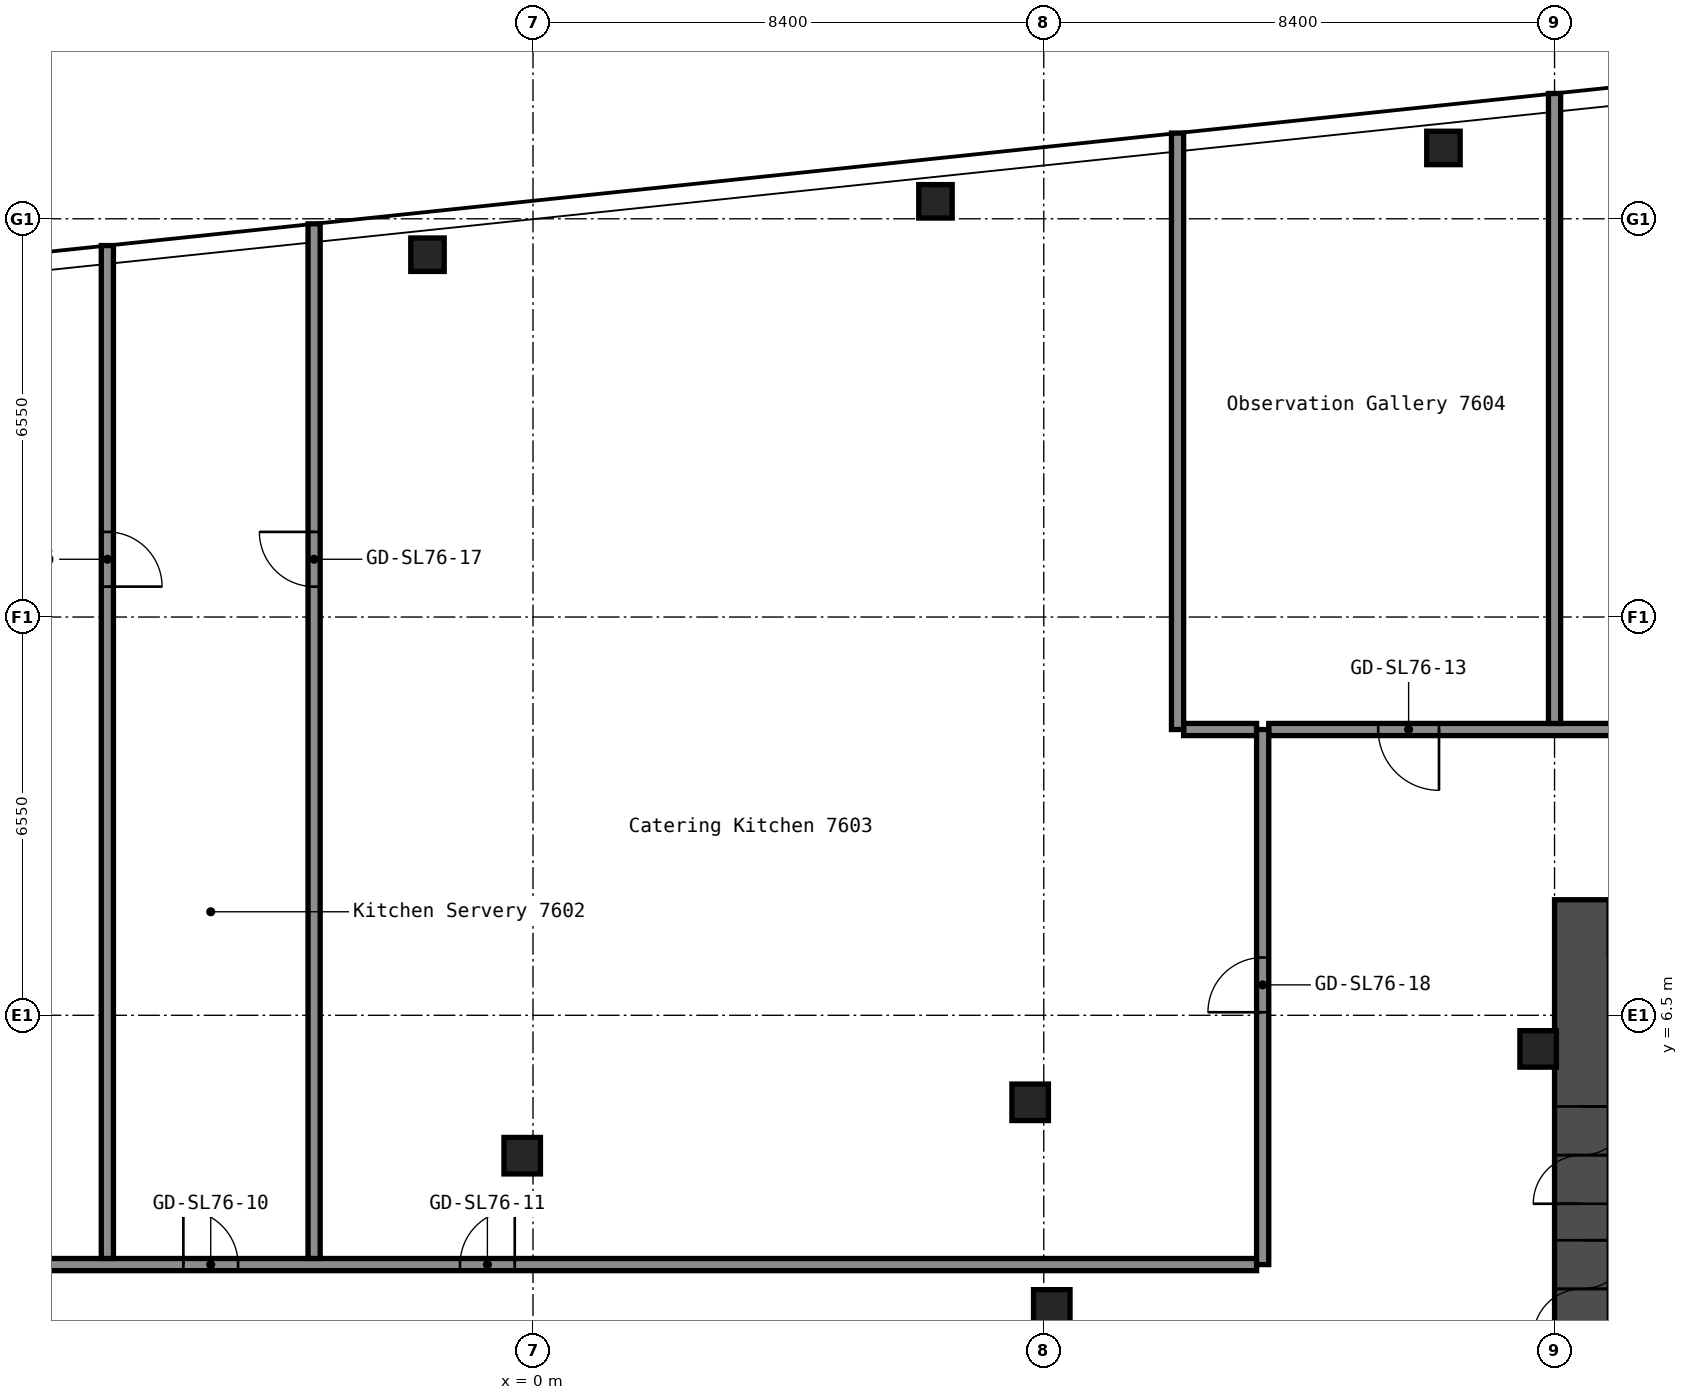
"""IFC4 building model, lengths in metres.
Left out: names, types, materials, properties, quantities, classifications, styles, units other than length and angle.
Written with IfcOpenShell. Run it as: python <this file> out.ifc"""

import sys

from ifc_helpers import new_model, si_unit, direction, frame, frame_2d, origin, origin_2d, place, context, subcontext, project, spatial, rectangle, hollow_rectangle, extrude, element, fill, save


model = new_model("IFC4")
c1 = context("Model", 3, precision=1e-05, world=origin(), true_north=direction((0.0, 1.0)))
c2 = subcontext(c1, "Body", "Model", "MODEL_VIEW")
j1 = project(units=[si_unit("LENGTHUNIT", "METRE"), si_unit("PLANEANGLEUNIT", "RADIAN")], contexts=[c1])
p1 = place(None, origin())
s1 = spatial("IfcSite", under=j1, at=p1, CompositionType="ELEMENT")
p2 = place(p1, origin())
s2 = spatial("IfcBuilding", under=s1, at=p2, CompositionType="ELEMENT")
p3 = place(p2, frame((0.0, 0.0, 270.6)))
s3 = spatial("IfcBuildingStorey", under=s2, at=p3, CompositionType="ELEMENT", Elevation=270.6)
p4 = place(p3, frame((-0.178, 4.191, 0.0), z_axis=(0.0, 0.0, 1.0), x_axis=(1.0, 0.0, 0.0)))
e1 = element("IfcColumn", 1, at=p4, inside=s3, PredefinedType="COLUMN", context=c2, shape_type="SweptSolid", body=[
    extrude(hollow_rectangle(XDim=0.6, YDim=0.6, WallThickness=0.025, InnerFilletRadius=0.038, OuterFilletRadius=0.062, at=origin_2d()), origin(), (0.0, 0.0, 1.0), 5.55),
])
p5 = place(p3, frame((-1.735, 19.009, 0.0), z_axis=(0.0, 0.0, 1.0), x_axis=(1.0, 0.0, 0.0)))
e2 = element("IfcColumn", 2, at=p5, inside=s3, PredefinedType="COLUMN", context=c2, shape_type="SweptSolid", body=[
    extrude(hollow_rectangle(XDim=0.55, YDim=0.55, WallThickness=0.022, InnerFilletRadius=0.033, OuterFilletRadius=0.055, at=origin_2d()), origin(), (0.0, 0.0, 1.0), 5.55),
])
for number, where, z_axis, x_axis in (
    (3, (8.532, 1.688, 0.0), (0.0, 0.0, 1.0), (1.0, 0.0, 0.0)),
    (4, (8.176, 5.069, 0.0), (0.0, 0.0, 1.0), (1.0, 0.0, 0.0)),
):
    element("IfcColumn", number, at=place(p3, frame(where, z_axis=z_axis, x_axis=x_axis)), inside=s3, PredefinedType="COLUMN", context=c2, shape_type="SweptSolid", body=[
        extrude(hollow_rectangle(XDim=0.6, YDim=0.6, WallThickness=0.025, InnerFilletRadius=0.038, OuterFilletRadius=0.062, at=origin_2d()), origin(), (0.0, 0.0, 1.0), 5.55),
    ])
p6 = place(p3, frame((6.619, 19.887, 0.0), z_axis=(0.0, 0.0, 1.0), x_axis=(1.0, 0.0, 0.0)))
e5 = element("IfcColumn", 5, at=p6, inside=s3, PredefinedType="COLUMN", context=c2, shape_type="SweptSolid", body=[
    extrude(hollow_rectangle(XDim=0.55, YDim=0.55, WallThickness=0.022, InnerFilletRadius=0.033, OuterFilletRadius=0.055, at=origin_2d()), origin(), (0.0, 0.0, 1.0), 5.55),
])
p7 = place(p3, frame((16.53, 5.947, 0.0), z_axis=(0.0, 0.0, 1.0), x_axis=(1.0, 0.0, 0.0)))
e6 = element("IfcColumn", 6, at=p7, inside=s3, PredefinedType="COLUMN", context=c2, shape_type="SweptSolid", body=[
    extrude(hollow_rectangle(XDim=0.6, YDim=0.6, WallThickness=0.025, InnerFilletRadius=0.038, OuterFilletRadius=0.062, at=origin_2d()), origin(), (0.0, 0.0, 1.0), 5.55),
])
p8 = place(p3, frame((14.973, 20.765, 0.0), z_axis=(0.0, 0.0, 1.0), x_axis=(1.0, 0.0, 0.0)))
e7 = element("IfcColumn", 7, at=p8, inside=s3, PredefinedType="COLUMN", context=c2, shape_type="SweptSolid", body=[
    extrude(hollow_rectangle(XDim=0.55, YDim=0.55, WallThickness=0.022, InnerFilletRadius=0.033, OuterFilletRadius=0.055, at=origin_2d()), origin(), (0.0, 0.0, 1.0), 5.55),
])
p9 = place(p3, frame((17.25, -8.4, 0.0), z_axis=(0.0, 0.0, 1.0), x_axis=(0.0, 1.0, 0.0)))
e8 = element("IfcWall", 8, at=p9, inside=s3, PredefinedType="SHEAR", context=c2, shape_type="SweptSolid", body=[
    extrude(rectangle(XDim=16.8, YDim=0.9, at=frame_2d((8.4, 0.0))), origin(), (0.0, 0.0, 1.0), 5.55),
])
p10 = place(p9, frame((3.4, 0.0, 0.0)))
e9 = element("IfcOpeningElement", 9, at=p10, cuts=e8, PredefinedType="OPENING", context=c2, shape_type="SweptSolid", body=[
    extrude(rectangle(XDim=1.6, YDim=2.1, at=frame_2d((0.8, 1.05))), frame((0.0, 0.46, 0.0), z_axis=(0.0, -1.0, 0.0), x_axis=(1.0, 0.0, 0.0)), (0.0, 0.0, 1.0), 0.92),
])
p11 = place(p9, frame((9.6, 0.0, 0.0)))
e10 = element("IfcOpeningElement", 10, at=p11, cuts=e8, PredefinedType="OPENING", context=c2, shape_type="SweptSolid", body=[
    extrude(rectangle(XDim=1.6, YDim=2.1, at=frame_2d((0.8, 1.05))), frame((0.0, 0.46, 0.0), z_axis=(0.0, -1.0, 0.0), x_axis=(1.0, 0.0, 0.0)), (0.0, 0.0, 1.0), 0.92),
])
p12 = place(p9, frame((11.8, 0.0, 0.0)))
e11 = element("IfcOpeningElement", 11, at=p12, cuts=e8, PredefinedType="OPENING", context=c2, shape_type="SweptSolid", body=[
    extrude(rectangle(XDim=1.6, YDim=2.1, at=frame_2d((0.8, 1.05))), frame((0.0, 0.46, 0.0), z_axis=(0.0, -1.0, 0.0), x_axis=(1.0, 0.0, 0.0)), (0.0, 0.0, 1.0), 0.92),
])
p13 = place(p3, frame((-13.1, 2.4, 0.0), z_axis=(0.0, 0.0, 1.0), x_axis=(1.0, 0.0, 0.0)))
e12 = element("IfcWall", 12, at=p13, inside=s3, PredefinedType="PARTITIONING", context=c2, shape_type="SweptSolid", body=[
    extrude(rectangle(XDim=25.0, YDim=0.2, at=frame_2d((12.5, 0.0))), origin(), (0.0, 0.0, 1.0), 5.55),
])
p14 = place(p13, frame((0.2, 0.0, 0.0)))
e13 = element("IfcOpeningElement", 13, at=p14, cuts=e12, PredefinedType="OPENING", context=c2, shape_type="SweptSolid", body=[
    extrude(rectangle(XDim=1.6, YDim=2.1, at=frame_2d((0.8, 1.05))), frame((0.0, 0.11, 0.0), z_axis=(0.0, -1.0, 0.0), x_axis=(1.0, 0.0, 0.0)), (0.0, 0.0, 1.0), 0.22),
])
p15 = place(p13, frame((7.35, 0.0, 0.0)))
e14 = element("IfcOpeningElement", 14, at=p15, cuts=e12, PredefinedType="OPENING", context=c2, shape_type="SweptSolid", body=[
    extrude(rectangle(XDim=0.9, YDim=2.1, at=frame_2d((0.45, 1.05))), frame((0.0, 0.11, 0.0), z_axis=(0.0, -1.0, 0.0), x_axis=(1.0, 0.0, 0.0)), (0.0, 0.0, 1.0), 0.22),
])
p16 = place(p13, frame((11.9, 0.0, 0.0)))
e15 = element("IfcOpeningElement", 15, at=p16, cuts=e12, PredefinedType="OPENING", context=c2, shape_type="SweptSolid", body=[
    extrude(rectangle(XDim=0.9, YDim=2.1, at=frame_2d((0.45, 1.05))), frame((0.0, 0.11, 0.0), z_axis=(0.0, -1.0, 0.0), x_axis=(1.0, 0.0, 0.0)), (0.0, 0.0, 1.0), 0.22),
])
p17 = place(p3, frame((10.7, 11.2, 0.0), z_axis=(0.0, 0.0, 1.0), x_axis=(1.0, 0.0, 0.0)))
e16 = element("IfcWall", 16, at=p17, inside=s3, PredefinedType="PARTITIONING", context=c2, shape_type="SweptSolid", body=[
    extrude(rectangle(XDim=1.2, YDim=0.2, at=frame_2d((0.6, 0.0))), origin(), (0.0, 0.0, 1.0), 5.55),
])
p18 = place(p3, frame((12.1, 11.2, 0.0), z_axis=(0.0, 0.0, 1.0), x_axis=(1.0, 0.0, 0.0)))
e17 = element("IfcWall", 17, at=p18, inside=s3, PredefinedType="PARTITIONING", context=c2, shape_type="SweptSolid", body=[
    extrude(rectangle(XDim=25.295, YDim=0.2, at=frame_2d((12.648, 0.0))), origin(), (0.0, 0.0, 1.0), 5.55),
])
p19 = place(p18, frame((1.8, 0.0, 0.0)))
e18 = element("IfcOpeningElement", 18, at=p19, cuts=e17, PredefinedType="OPENING", context=c2, shape_type="SweptSolid", body=[
    extrude(rectangle(XDim=1.0, YDim=2.1, at=frame_2d((0.5, 1.05))), frame((0.0, 0.11, 0.0), z_axis=(0.0, -1.0, 0.0), x_axis=(1.0, 0.0, 0.0)), (0.0, 0.0, 1.0), 0.22),
])
p20 = place(p18, frame((9.6, 0.0, 0.0)))
e19 = element("IfcOpeningElement", 19, at=p20, cuts=e17, PredefinedType="OPENING", context=c2, shape_type="SweptSolid", body=[
    extrude(rectangle(XDim=1.6, YDim=2.1, at=frame_2d((0.8, 1.05))), frame((0.0, 0.11, 0.0), z_axis=(0.0, -1.0, 0.0), x_axis=(1.0, 0.0, 0.0)), (0.0, 0.0, 1.0), 0.22),
])
p21 = place(p18, frame((20.8, 0.0, 0.0)))
e20 = element("IfcOpeningElement", 20, at=p21, cuts=e17, PredefinedType="OPENING", context=c2, shape_type="SweptSolid", body=[
    extrude(rectangle(XDim=1.0, YDim=2.1, at=frame_2d((0.5, 1.05))), frame((0.0, 0.11, 0.0), z_axis=(0.0, -1.0, 0.0), x_axis=(1.0, 0.0, 0.0)), (0.0, 0.0, 1.0), 0.22),
])
p22 = place(p3, frame((-7.0, 2.5, 0.0), z_axis=(0.0, 0.0, 1.0), x_axis=(0.0, 1.0, 0.0)))
e21 = element("IfcWall", 21, at=p22, inside=s3, PredefinedType="PARTITIONING", context=c2, shape_type="SweptSolid", body=[
    extrude(rectangle(XDim=16.66, YDim=0.2, at=frame_2d((8.33, 0.0))), origin(), (0.0, 0.0, 1.0), 5.55),
])
p23 = place(p22, frame((11.05, 0.0, 0.0)))
e22 = element("IfcOpeningElement", 22, at=p23, cuts=e21, PredefinedType="OPENING", context=c2, shape_type="SweptSolid", body=[
    extrude(rectangle(XDim=0.9, YDim=2.1, at=frame_2d((0.45, 1.05))), frame((0.0, 0.11, 0.0), z_axis=(0.0, -1.0, 0.0), x_axis=(1.0, 0.0, 0.0)), (0.0, 0.0, 1.0), 0.22),
])
p24 = place(p3, frame((-3.6, 2.5, 0.0), z_axis=(0.0, 0.0, 1.0), x_axis=(0.0, 1.0, 0.0)))
e23 = element("IfcWall", 23, at=p24, inside=s3, PredefinedType="PARTITIONING", context=c2, shape_type="SweptSolid", body=[
    extrude(rectangle(XDim=17.017, YDim=0.2, at=frame_2d((8.508, 0.0))), origin(), (0.0, 0.0, 1.0), 5.55),
])
p25 = place(p24, frame((11.05, 0.0, 0.0)))
e24 = element("IfcOpeningElement", 24, at=p25, cuts=e23, PredefinedType="OPENING", context=c2, shape_type="SweptSolid", body=[
    extrude(rectangle(XDim=0.9, YDim=2.1, at=frame_2d((0.45, 1.05))), frame((0.0, 0.11, 0.0), z_axis=(0.0, -1.0, 0.0), x_axis=(1.0, 0.0, 0.0)), (0.0, 0.0, 1.0), 0.22),
])
p26 = place(p3, frame((10.6, 11.2, 0.0), z_axis=(0.0, 0.0, 1.0), x_axis=(0.0, 1.0, 0.0)))
e25 = element("IfcWall", 25, at=p26, inside=s3, PredefinedType="PARTITIONING", context=c2, shape_type="SweptSolid", body=[
    extrude(rectangle(XDim=9.81, YDim=0.2, at=frame_2d((4.905, 0.0))), origin(), (0.0, 0.0, 1.0), 5.55),
])
p27 = place(p3, frame((12.0, 2.4, 0.0), z_axis=(0.0, 0.0, 1.0), x_axis=(0.0, 1.0, 0.0)))
e26 = element("IfcWall", 26, at=p27, inside=s3, PredefinedType="PARTITIONING", context=c2, shape_type="SweptSolid", body=[
    extrude(rectangle(XDim=8.8, YDim=0.2, at=frame_2d((4.4, 0.0))), origin(), (0.0, 0.0, 1.0), 5.55),
])
p28 = place(p27, frame((4.15, 0.0, 0.0)))
e27 = element("IfcOpeningElement", 27, at=p28, cuts=e26, PredefinedType="OPENING", context=c2, shape_type="SweptSolid", body=[
    extrude(rectangle(XDim=0.9, YDim=2.1, at=frame_2d((0.45, 1.05))), frame((0.0, 0.11, 0.0), z_axis=(0.0, -1.0, 0.0), x_axis=(1.0, 0.0, 0.0)), (0.0, 0.0, 1.0), 0.22),
])
p29 = place(p3, frame((16.8, 11.3, 0.0), z_axis=(0.0, 0.0, 1.0), x_axis=(0.0, 1.0, 0.0)))
e28 = element("IfcWall", 28, at=p29, inside=s3, PredefinedType="PARTITIONING", context=c2, shape_type="SweptSolid", body=[
    extrude(rectangle(XDim=10.361, YDim=0.2, at=frame_2d((5.18, 0.0))), origin(), (0.0, 0.0, 1.0), 5.55),
])
p30 = place(p11, origin())
e29 = element("IfcDoor", 29, at=p30, inside=s3, OperationType="DOUBLE_DOOR_SINGLE_SWING", PredefinedType="DOOR", context=c2, shape_type="SweptSolid", body=[
    extrude(rectangle(XDim=1.6, YDim=2.1, at=frame_2d((0.8, 1.05))), frame((0.0, 0.025, 0.0), z_axis=(0.0, -1.0, 0.0), x_axis=(1.0, 0.0, 0.0)), (0.0, 0.0, 1.0), 0.05),
])
fill(e10, e29)
p31 = place(p12, origin())
e30 = element("IfcDoor", 30, at=p31, inside=s3, OperationType="DOUBLE_DOOR_SINGLE_SWING", PredefinedType="DOOR", context=c2, shape_type="SweptSolid", body=[
    extrude(rectangle(XDim=1.6, YDim=2.1, at=frame_2d((0.8, 1.05))), frame((0.0, 0.025, 0.0), z_axis=(0.0, -1.0, 0.0), x_axis=(1.0, 0.0, 0.0)), (0.0, 0.0, 1.0), 0.05),
])
fill(e11, e30)
p32 = place(p15, origin())
e31 = element("IfcDoor", 31, at=p32, inside=s3, OperationType="SINGLE_SWING_RIGHT", PredefinedType="DOOR", context=c2, shape_type="SweptSolid", body=[
    extrude(rectangle(XDim=0.9, YDim=2.1, at=frame_2d((0.45, 1.05))), frame((0.0, 0.025, 0.0), z_axis=(0.0, -1.0, 0.0), x_axis=(1.0, 0.0, 0.0)), (0.0, 0.0, 1.0), 0.05),
])
fill(e14, e31)
p33 = place(p16, origin())
e32 = element("IfcDoor", 32, at=p33, inside=s3, OperationType="SINGLE_SWING_LEFT", PredefinedType="DOOR", context=c2, shape_type="SweptSolid", body=[
    extrude(rectangle(XDim=0.9, YDim=2.1, at=frame_2d((0.45, 1.05))), frame((0.0, 0.025, 0.0), z_axis=(0.0, -1.0, 0.0), x_axis=(1.0, 0.0, 0.0)), (0.0, 0.0, 1.0), 0.05),
])
fill(e15, e32)
p34 = place(p19, origin())
e33 = element("IfcDoor", 33, at=p34, inside=s3, OperationType="SINGLE_SWING_RIGHT", PredefinedType="DOOR", context=c2, shape_type="SweptSolid", body=[
    extrude(rectangle(XDim=1.0, YDim=2.1, at=frame_2d((0.5, 1.05))), frame((0.0, 0.025, 0.0), z_axis=(0.0, -1.0, 0.0), x_axis=(1.0, 0.0, 0.0)), (0.0, 0.0, 1.0), 0.05),
])
fill(e18, e33)
p35 = place(p23, origin())
e34 = element("IfcDoor", 34, at=p35, inside=s3, OperationType="SINGLE_SWING_LEFT", PredefinedType="DOOR", context=c2, shape_type="SweptSolid", body=[
    extrude(rectangle(XDim=0.9, YDim=2.1, at=frame_2d((0.45, 1.05))), frame((0.0, 0.025, 0.0), z_axis=(0.0, -1.0, 0.0), x_axis=(1.0, 0.0, 0.0)), (0.0, 0.0, 1.0), 0.05),
])
fill(e22, e34)
p36 = place(p25, origin())
e35 = element("IfcDoor", 35, at=p36, inside=s3, OperationType="SINGLE_SWING_LEFT", PredefinedType="DOOR", context=c2, shape_type="SweptSolid", body=[
    extrude(rectangle(XDim=0.9, YDim=2.1, at=frame_2d((0.45, 1.05))), frame((0.0, 0.025, 0.0), z_axis=(0.0, -1.0, 0.0), x_axis=(1.0, 0.0, 0.0)), (0.0, 0.0, 1.0), 0.05),
])
fill(e24, e35)
p37 = place(p28, origin())
e36 = element("IfcDoor", 36, at=p37, inside=s3, OperationType="SINGLE_SWING_RIGHT", PredefinedType="DOOR", context=c2, shape_type="SweptSolid", body=[
    extrude(rectangle(XDim=0.9, YDim=2.1, at=frame_2d((0.45, 1.05))), frame((0.0, 0.025, 0.0), z_axis=(0.0, -1.0, 0.0), x_axis=(1.0, 0.0, 0.0)), (0.0, 0.0, 1.0), 0.05),
])
fill(e27, e36)
save(model, sys.argv[1])
